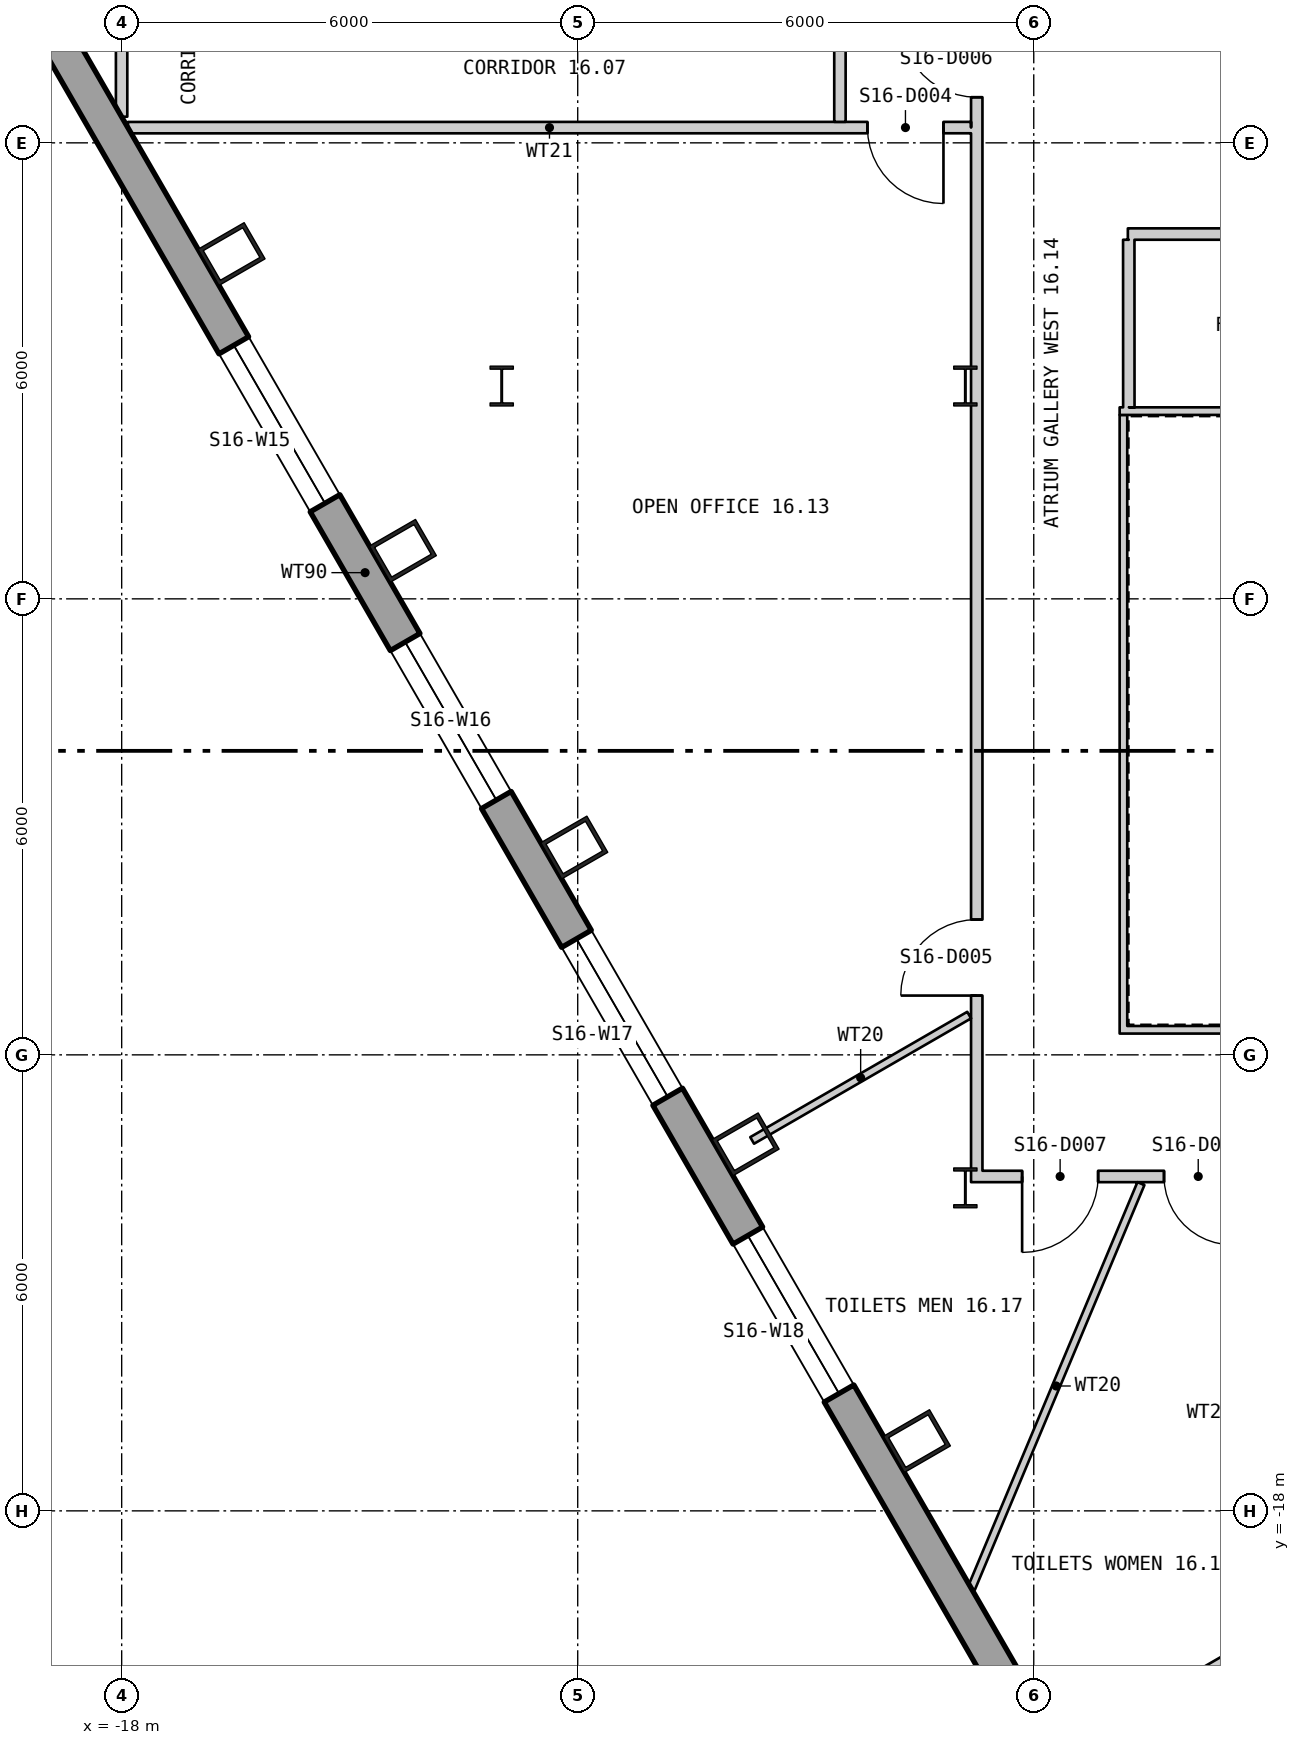
"""IFC4 building model, lengths in metres.
Left out: names, types, materials, properties, quantities, classifications, styles, units other than length and angle.
Written with IfcOpenShell. Run it as: python <this file> out.ifc"""

import sys

from ifc_helpers import new_model, si_unit, direction, frame, frame_2d, origin, origin_2d, place, context, subcontext, project, spatial, polyline, rectangle, hollow_rectangle, i_section, outline, extrude, element, fill, save


model = new_model("IFC4")
c1 = context("Model", 3, precision=1e-05, world=origin(), true_north=direction((0.0, 1.0)))
c2 = subcontext(c1, "Body", "Model", "MODEL_VIEW")
j1 = project(units=[si_unit("LENGTHUNIT", "METRE"), si_unit("PLANEANGLEUNIT", "RADIAN")], contexts=[c1])
p1 = place(None, origin())
s1 = spatial("IfcSite", under=j1, at=p1, CompositionType="ELEMENT")
p2 = place(p1, origin())
s2 = spatial("IfcBuilding", under=s1, at=p2, CompositionType="ELEMENT")
p3 = place(p2, frame((0.0, 0.0, 216.0)))
s3 = spatial("IfcBuildingStorey", under=s2, at=p3, CompositionType="ELEMENT", Elevation=216.0)
for number, where, z_axis, x_axis in (
    (1, (-16.554, -1.463, 0.0), (0.0, 0.0, 1.0), (0.5, -0.866, 0.0)),
    (2, (-14.3, -5.368, 0.0), (0.0, 0.0, 1.0), (0.5, -0.866, 0.0)),
    (3, (-12.045, -9.272, 0.0), (0.0, 0.0, 1.0), (0.5, -0.866, 0.0)),
    (4, (-9.791, -13.177, 0.0), (0.0, 0.0, 1.0), (0.5, -0.866, 0.0)),
    (5, (-7.537, -17.082, 0.0), (0.0, 0.0, 1.0), (0.5, -0.866, 0.0)),
):
    element("IfcColumn", number, at=place(p3, frame(where, z_axis=z_axis, x_axis=x_axis)), inside=s3, PredefinedType="COLUMN", context=c2, shape_type="SweptSolid", body=[
        extrude(hollow_rectangle(XDim=0.55, YDim=0.7, WallThickness=0.05, at=origin_2d()), origin(), (0.0, 0.0, 1.0), 3.9),
    ])
for number, where, z_axis, x_axis in (
    (6, (-6.9, -3.2, 0.0), (0.0, 0.0, 1.0), (1.0, 0.0, 0.0)),
    (7, (-6.9, -13.75, 0.0), (0.0, 0.0, 1.0), (1.0, 0.0, 0.0)),
    (8, (-13.0, -3.2, 0.0), (0.0, 0.0, 1.0), (1.0, 0.0, 0.0)),
):
    element("IfcColumn", number, at=place(p3, frame(where, z_axis=z_axis, x_axis=x_axis)), inside=s3, PredefinedType="COLUMN", context=c2, shape_type="SweptSolid", body=[
        extrude(i_section(OverallWidth=0.306, OverallDepth=0.524, WebThickness=0.021, FlangeThickness=0.04, at=origin_2d()), origin(), (0.0, 0.0, 1.0), 3.9),
    ])
p4 = place(p3, frame((-26.235, 14.155, -0.18), z_axis=(0.0, 0.0, 1.0), x_axis=(0.500000335318, -0.866025210188, 0.0)))
e9 = element("IfcWall", 9, at=p4, inside=s3, PredefinedType="SOLIDWALL", context=c2, shape_type="SweptSolid", body=[
    extrude(outline(polyline([(-0.13, -0.225), (45.88, -0.225), (45.62, 0.225), (0.13, 0.225), (-0.13, -0.225)])), origin(), (0.0, 0.0, 1.0), 3.68),
])
p5 = place(p4, frame((1.425, 0.0, 1.08)))
e10 = element("IfcOpeningElement", 10, at=p5, cuts=e9, PredefinedType="OPENING", context=c2, shape_type="SweptSolid", body=[
    extrude(rectangle(XDim=2.4, YDim=2.0, at=frame_2d((1.2, 1.0))), frame((0.0, 0.235, 0.0), z_axis=(0.0, -1.0, 0.0), x_axis=(1.0, 0.0, 0.0)), (0.0, 0.0, 1.0), 0.47),
])
p6 = place(p4, frame((5.895, 0.0, 1.08)))
e11 = element("IfcOpeningElement", 11, at=p6, cuts=e9, PredefinedType="OPENING", context=c2, shape_type="SweptSolid", body=[
    extrude(rectangle(XDim=2.4, YDim=2.0, at=frame_2d((1.2, 1.0))), frame((0.0, 0.235, 0.0), z_axis=(0.0, -1.0, 0.0), x_axis=(1.0, 0.0, 0.0)), (0.0, 0.0, 1.0), 0.47),
])
p7 = place(p4, frame((10.403, 0.0, 1.08)))
e12 = element("IfcOpeningElement", 12, at=p7, cuts=e9, PredefinedType="OPENING", context=c2, shape_type="SweptSolid", body=[
    extrude(rectangle(XDim=2.4, YDim=2.0, at=frame_2d((1.2, 1.0))), frame((0.0, 0.235, 0.0), z_axis=(0.0, -1.0, 0.0), x_axis=(1.0, 0.0, 0.0)), (0.0, 0.0, 1.0), 0.47),
])
p8 = place(p4, frame((19.421, 0.0, 1.08)))
e13 = element("IfcOpeningElement", 13, at=p8, cuts=e9, PredefinedType="OPENING", context=c2, shape_type="SweptSolid", body=[
    extrude(rectangle(XDim=2.4, YDim=2.0, at=frame_2d((1.2, 1.0))), frame((0.0, 0.235, 0.0), z_axis=(0.0, -1.0, 0.0), x_axis=(1.0, 0.0, 0.0)), (0.0, 0.0, 1.0), 0.47),
])
p9 = place(p4, frame((23.929, 0.0, 1.08)))
e14 = element("IfcOpeningElement", 14, at=p9, cuts=e9, PredefinedType="OPENING", context=c2, shape_type="SweptSolid", body=[
    extrude(rectangle(XDim=2.4, YDim=2.0, at=frame_2d((1.2, 1.0))), frame((0.0, 0.235, 0.0), z_axis=(0.0, -1.0, 0.0), x_axis=(1.0, 0.0, 0.0)), (0.0, 0.0, 1.0), 0.47),
])
p10 = place(p4, frame((28.438, 0.0, 1.08)))
e15 = element("IfcOpeningElement", 15, at=p10, cuts=e9, PredefinedType="OPENING", context=c2, shape_type="SweptSolid", body=[
    extrude(rectangle(XDim=2.4, YDim=2.0, at=frame_2d((1.2, 1.0))), frame((0.0, 0.235, 0.0), z_axis=(0.0, -1.0, 0.0), x_axis=(1.0, 0.0, 0.0)), (0.0, 0.0, 1.0), 0.47),
])
p11 = place(p4, frame((32.947, 0.0, 1.08)))
e16 = element("IfcOpeningElement", 16, at=p11, cuts=e9, PredefinedType="OPENING", context=c2, shape_type="SweptSolid", body=[
    extrude(rectangle(XDim=2.4, YDim=2.0, at=frame_2d((1.2, 1.0))), frame((0.0, 0.235, 0.0), z_axis=(0.0, -1.0, 0.0), x_axis=(1.0, 0.0, 0.0)), (0.0, 0.0, 1.0), 0.47),
])
p12 = place(p4, frame((41.925, 0.0, 1.08)))
e17 = element("IfcOpeningElement", 17, at=p12, cuts=e9, PredefinedType="OPENING", context=c2, shape_type="SweptSolid", body=[
    extrude(rectangle(XDim=2.4, YDim=2.0, at=frame_2d((1.2, 1.0))), frame((0.0, 0.235, 0.0), z_axis=(0.0, -1.0, 0.0), x_axis=(1.0, 0.0, 0.0)), (0.0, 0.0, 1.0), 0.47),
])
for number, where, z_axis, x_axis in (
    (18, (-4.87, -11.67, 0.0), (0.0, 0.0, 1.0), (1.0, 0.0, 0.0)),
    (19, (4.87, -3.53, 0.0), (0.0, 0.0, 1.0), (-1.0, 0.0, 0.0)),
):
    element("IfcWall", number, at=place(p3, frame(where, z_axis=z_axis, x_axis=x_axis)), inside=s3, PredefinedType="PARTITIONING", context=c2, shape_type="SweptSolid", body=[
        extrude(rectangle(XDim=9.74, YDim=0.1, at=frame_2d((4.87, 0.0))), origin(), (0.0, 0.0, 1.0), 3.7),
    ])
p13 = place(p3, frame((-4.82, -3.58, 0.0), z_axis=(0.0, 0.0, 1.0), x_axis=(0.0, -1.0, 0.0)))
e20 = element("IfcWall", 20, at=p13, inside=s3, PredefinedType="PARTITIONING", context=c2, shape_type="SweptSolid", body=[
    extrude(rectangle(XDim=8.04, YDim=0.1, at=frame_2d((4.02, 0.0))), origin(), (0.0, 0.0, 1.0), 3.7),
])
p14 = place(p3, frame((-18.001, 0.344, 0.0), z_axis=(0.0, 0.0, 1.0), x_axis=(7.732158e-05, 0.999999997011, 0.0)))
e21 = element("IfcWall", 21, at=p14, inside=s3, PredefinedType="PARTITIONING", context=c2, shape_type="SweptSolid", body=[
    extrude(rectangle(XDim=12.933, YDim=0.15, at=frame_2d((6.466, 0.0))), origin(), (0.0, 0.0, 1.0), 3.7),
])
p15 = place(p14, frame((2.707, 0.0, 0.0)))
e22 = element("IfcOpeningElement", 22, at=p15, cuts=e21, PredefinedType="OPENING", context=c2, shape_type="SweptSolid", body=[
    extrude(rectangle(XDim=1.0, YDim=2.1, at=frame_2d((0.5, 1.05))), frame((0.0, 0.085, 0.0), z_axis=(0.0, -1.0, 0.0), x_axis=(1.0, 0.0, 0.0)), (0.0, 0.0, 1.0), 0.17),
])
p16 = place(p3, frame((-17.918, 0.2, 0.0), z_axis=(0.0, 0.0, 1.0), x_axis=(0.999999995937, 9.0146939e-05, 0.0)))
e23 = element("IfcWall", 23, at=p16, inside=s3, PredefinedType="PARTITIONING", context=c2, shape_type="SweptSolid", body=[
    extrude(rectangle(XDim=11.093, YDim=0.15, at=frame_2d((5.546, 0.0))), origin(), (0.0, 0.0, 1.0), 3.7),
])
p17 = place(p16, frame((9.73, 0.0, 0.0)))
e24 = element("IfcOpeningElement", 24, at=p17, cuts=e23, PredefinedType="OPENING", context=c2, shape_type="SweptSolid", body=[
    extrude(rectangle(XDim=1.0, YDim=2.1, at=frame_2d((0.5, 1.05))), frame((0.0, 0.085, 0.0), z_axis=(0.0, -1.0, 0.0), x_axis=(1.0, 0.0, 0.0)), (0.0, 0.0, 1.0), 0.17),
])
p18 = place(p3, frame((-9.705, -13.126, 0.0), z_axis=(0.0, 0.0, 1.0), x_axis=(0.865938055058, 0.500151261923, 0.0)))
e25 = element("IfcWall", 25, at=p18, inside=s3, PredefinedType="PARTITIONING", context=c2, shape_type="SweptSolid", body=[
    extrude(rectangle(XDim=3.297, YDim=0.1, at=frame_2d((1.649, 0.0))), origin(), (0.0, 0.0, 1.0), 3.7),
])
p19 = place(p3, frame((-8.55, 0.276, 0.0), z_axis=(0.0, 0.0, 1.0), x_axis=(0.0, 1.0, 0.0)))
e26 = element("IfcWall", 26, at=p19, inside=s3, PredefinedType="PARTITIONING", context=c2, shape_type="SweptSolid", body=[
    extrude(rectangle(XDim=1.723, YDim=0.15, at=frame_2d((0.862, 0.0))), origin(), (0.0, 0.0, 1.0), 3.7),
])
p20 = place(p3, frame((-6.821, -19.02, 0.0), z_axis=(0.0, 0.0, 1.0), x_axis=(0.386360825785, 0.922347717674, 0.0)))
e27 = element("IfcWall", 27, at=p20, inside=s3, PredefinedType="PARTITIONING", context=c2, shape_type="SweptSolid", body=[
    extrude(rectangle(XDim=5.774, YDim=0.1, at=frame_2d((2.887, 0.0))), origin(), (0.0, 0.0, 1.0), 3.7),
])
p21 = place(p3, frame((-6.75, -13.675, 0.0), z_axis=(0.0, 0.0, 1.0), x_axis=(0.0, 1.0, 0.0)))
e28 = element("IfcWall", 28, at=p21, inside=s3, PredefinedType="PARTITIONING", context=c2, shape_type="SweptSolid", body=[
    extrude(rectangle(XDim=10.263, YDim=0.15, at=frame_2d((5.131, 0.0))), origin(), (0.0, 0.0, 1.0), 3.11),
])
p22 = place(p21, frame((2.455, 0.0, 0.0)))
e29 = element("IfcOpeningElement", 29, at=p22, cuts=e28, PredefinedType="OPENING", context=c2, shape_type="SweptSolid", body=[
    extrude(rectangle(XDim=1.0, YDim=2.1, at=frame_2d((0.5, 1.05))), frame((0.0, 0.085, 0.0), z_axis=(0.0, -1.0, 0.0), x_axis=(1.0, 0.0, 0.0)), (0.0, 0.0, 1.0), 0.17),
])
p23 = place(p3, frame((-6.75, -3.412, 0.0), z_axis=(0.0, 0.0, 1.0), x_axis=(0.0, 1.0, 0.0)))
e30 = element("IfcWall", 30, at=p23, inside=s3, PredefinedType="PARTITIONING", context=c2, shape_type="SweptSolid", body=[
    extrude(rectangle(XDim=5.412, YDim=0.15, at=frame_2d((2.706, 0.0))), origin(), (0.0, 0.0, 1.0), 3.7),
])
p24 = place(p23, frame((4.012, 0.0, 0.0)))
e31 = element("IfcOpeningElement", 31, at=p24, cuts=e30, PredefinedType="OPENING", context=c2, shape_type="SweptSolid", body=[
    extrude(rectangle(XDim=1.0, YDim=2.1, at=frame_2d((0.5, 1.05))), frame((0.0, 0.085, 0.0), z_axis=(0.0, -1.0, 0.0), x_axis=(1.0, 0.0, 0.0)), (0.0, 0.0, 1.0), 0.17),
])
p25 = place(p3, frame((-6.675, -13.6, 0.0), z_axis=(0.0, 0.0, 1.0), x_axis=(1.0, 0.0, 0.0)))
e32 = element("IfcWall", 32, at=p25, inside=s3, PredefinedType="PARTITIONING", context=c2, shape_type="SweptSolid", body=[
    extrude(rectangle(XDim=4.975, YDim=0.15, at=frame_2d((2.487, 0.0))), origin(), (0.0, 0.0, 1.0), 2.91),
])
p26 = place(p25, frame((0.522, 0.0, 0.0)))
e33 = element("IfcOpeningElement", 33, at=p26, cuts=e32, PredefinedType="OPENING", context=c2, shape_type="SweptSolid", body=[
    extrude(rectangle(XDim=1.0, YDim=2.1, at=frame_2d((0.5, 1.05))), frame((0.0, 0.085, 0.0), z_axis=(0.0, -1.0, 0.0), x_axis=(1.0, 0.0, 0.0)), (0.0, 0.0, 1.0), 0.17),
])
p27 = place(p25, frame((2.389, 0.0, 0.0)))
e34 = element("IfcOpeningElement", 34, at=p27, cuts=e32, PredefinedType="OPENING", context=c2, shape_type="SweptSolid", body=[
    extrude(rectangle(XDim=0.9, YDim=2.1, at=frame_2d((0.45, 1.05))), frame((0.0, 0.085, 0.0), z_axis=(0.0, -1.0, 0.0), x_axis=(1.0, 0.0, 0.0)), (0.0, 0.0, 1.0), 0.17),
])
p28 = place(p25, frame((3.753, 0.0, 0.0)))
e35 = element("IfcOpeningElement", 35, at=p28, cuts=e32, PredefinedType="OPENING", context=c2, shape_type="SweptSolid", body=[
    extrude(rectangle(XDim=1.0, YDim=2.1, at=frame_2d((0.5, 1.05))), frame((0.0, 0.085, 0.0), z_axis=(0.0, -1.0, 0.0), x_axis=(1.0, 0.0, 0.0)), (0.0, 0.0, 1.0), 0.17),
])
p29 = place(p3, frame((-5.195, -20.937, 0.0), z_axis=(0.0, 0.0, 1.0), x_axis=(0.866092546171, 0.499883687939, 0.0)))
e36 = element("IfcWall", 36, at=p29, inside=s3, PredefinedType="PARTITIONING", context=c2, shape_type="SweptSolid", body=[
    extrude(rectangle(XDim=2.326, YDim=0.1, at=frame_2d((1.163, 0.0))), origin(), (0.0, 0.0, 1.0), 3.7),
])
p30 = place(p3, frame((-4.762, -1.2, 0.0), z_axis=(0.0, 0.0, 1.0), x_axis=(1.0, 0.0, 0.0)))
e37 = element("IfcWall", 37, at=p30, inside=s3, PredefinedType="PARTITIONING", context=c2, shape_type="SweptSolid", body=[
    extrude(rectangle(XDim=11.587, YDim=0.15, at=frame_2d((5.793, 0.0))), origin(), (0.0, 0.0, 1.0), 3.7),
])
p31 = place(p30, frame((3.561, 0.0, 0.0)))
e38 = element("IfcOpeningElement", 38, at=p31, cuts=e37, PredefinedType="OPENING", context=c2, shape_type="SweptSolid", body=[
    extrude(rectangle(XDim=1.0, YDim=2.1, at=frame_2d((0.5, 1.05))), frame((0.0, 0.085, 0.0), z_axis=(0.0, -1.0, 0.0), x_axis=(1.0, 0.0, 0.0)), (0.0, 0.0, 1.0), 0.17),
])
p32 = place(p3, frame((-4.75, -1.275, 0.0), z_axis=(0.0, 0.0, 1.0), x_axis=(0.000453514693, -0.999999897162, 0.0)))
e39 = element("IfcWall", 39, at=p32, inside=s3, PredefinedType="PARTITIONING", context=c2, shape_type="SweptSolid", body=[
    extrude(rectangle(XDim=2.205, YDim=0.15, at=frame_2d((1.103, 0.0))), origin(), (0.0, 0.0, 1.0), 3.7),
])
p33 = place(p8, origin())
e40 = element("IfcWindow", 40, at=p33, inside=s3, PartitioningType="SINGLE_PANEL", PredefinedType="WINDOW", context=c2, shape_type="SweptSolid", body=[
    extrude(rectangle(XDim=2.4, YDim=2.0, at=frame_2d((1.2, 1.0))), frame((0.0, 0.105, 0.0), z_axis=(0.0, -1.0, 0.0), x_axis=(1.0, 0.0, 0.0)), (0.0, 0.0, 1.0), 0.06),
])
fill(e13, e40)
p34 = place(p9, origin())
e41 = element("IfcWindow", 41, at=p34, inside=s3, PartitioningType="SINGLE_PANEL", PredefinedType="WINDOW", context=c2, shape_type="SweptSolid", body=[
    extrude(rectangle(XDim=2.4, YDim=2.0, at=frame_2d((1.2, 1.0))), frame((0.0, 0.105, 0.0), z_axis=(0.0, -1.0, 0.0), x_axis=(1.0, 0.0, 0.0)), (0.0, 0.0, 1.0), 0.06),
])
fill(e14, e41)
p35 = place(p10, origin())
e42 = element("IfcWindow", 42, at=p35, inside=s3, PartitioningType="SINGLE_PANEL", PredefinedType="WINDOW", context=c2, shape_type="SweptSolid", body=[
    extrude(rectangle(XDim=2.4, YDim=2.0, at=frame_2d((1.2, 1.0))), frame((0.0, 0.105, 0.0), z_axis=(0.0, -1.0, 0.0), x_axis=(1.0, 0.0, 0.0)), (0.0, 0.0, 1.0), 0.06),
])
fill(e15, e42)
p36 = place(p11, origin())
e43 = element("IfcWindow", 43, at=p36, inside=s3, PartitioningType="SINGLE_PANEL", PredefinedType="WINDOW", context=c2, shape_type="SweptSolid", body=[
    extrude(rectangle(XDim=2.4, YDim=2.0, at=frame_2d((1.2, 1.0))), frame((0.0, 0.105, 0.0), z_axis=(0.0, -1.0, 0.0), x_axis=(1.0, 0.0, 0.0)), (0.0, 0.0, 1.0), 0.06),
])
fill(e16, e43)
p37 = place(p17, origin())
e44 = element("IfcDoor", 44, at=p37, inside=s3, OperationType="SINGLE_SWING_RIGHT", PredefinedType="DOOR", context=c2, shape_type="SweptSolid", body=[
    extrude(rectangle(XDim=1.0, YDim=2.1, at=frame_2d((0.5, 1.05))), frame((0.0, 0.025, 0.0), z_axis=(0.0, -1.0, 0.0), x_axis=(1.0, 0.0, 0.0)), (0.0, 0.0, 1.0), 0.05),
])
fill(e24, e44)
p38 = place(p22, origin())
e45 = element("IfcDoor", 45, at=p38, inside=s3, OperationType="SINGLE_SWING_RIGHT", PredefinedType="DOOR", context=c2, shape_type="SweptSolid", body=[
    extrude(rectangle(XDim=1.0, YDim=2.1, at=frame_2d((0.5, 1.05))), frame((0.0, 0.025, 0.0), z_axis=(0.0, -1.0, 0.0), x_axis=(1.0, 0.0, 0.0)), (0.0, 0.0, 1.0), 0.05),
])
fill(e29, e45)
p39 = place(p24, origin())
e46 = element("IfcDoor", 46, at=p39, inside=s3, OperationType="SINGLE_SWING_LEFT", PredefinedType="DOOR", context=c2, shape_type="SweptSolid", body=[
    extrude(rectangle(XDim=1.0, YDim=2.1, at=frame_2d((0.5, 1.05))), frame((0.0, 0.025, 0.0), z_axis=(0.0, -1.0, 0.0), x_axis=(1.0, 0.0, 0.0)), (0.0, 0.0, 1.0), 0.05),
])
fill(e31, e46)
p40 = place(p26, origin())
e47 = element("IfcDoor", 47, at=p40, inside=s3, OperationType="SINGLE_SWING_LEFT", PredefinedType="DOOR", context=c2, shape_type="SweptSolid", body=[
    extrude(rectangle(XDim=1.0, YDim=2.1, at=frame_2d((0.5, 1.05))), frame((0.0, 0.025, 0.0), z_axis=(0.0, -1.0, 0.0), x_axis=(1.0, 0.0, 0.0)), (0.0, 0.0, 1.0), 0.05),
])
fill(e33, e47)
p41 = place(p27, origin())
e48 = element("IfcDoor", 48, at=p41, inside=s3, OperationType="SINGLE_SWING_RIGHT", PredefinedType="DOOR", context=c2, shape_type="SweptSolid", body=[
    extrude(rectangle(XDim=0.9, YDim=2.1, at=frame_2d((0.45, 1.05))), frame((0.0, 0.025, 0.0), z_axis=(0.0, -1.0, 0.0), x_axis=(1.0, 0.0, 0.0)), (0.0, 0.0, 1.0), 0.05),
])
fill(e34, e48)
save(model, sys.argv[1])
